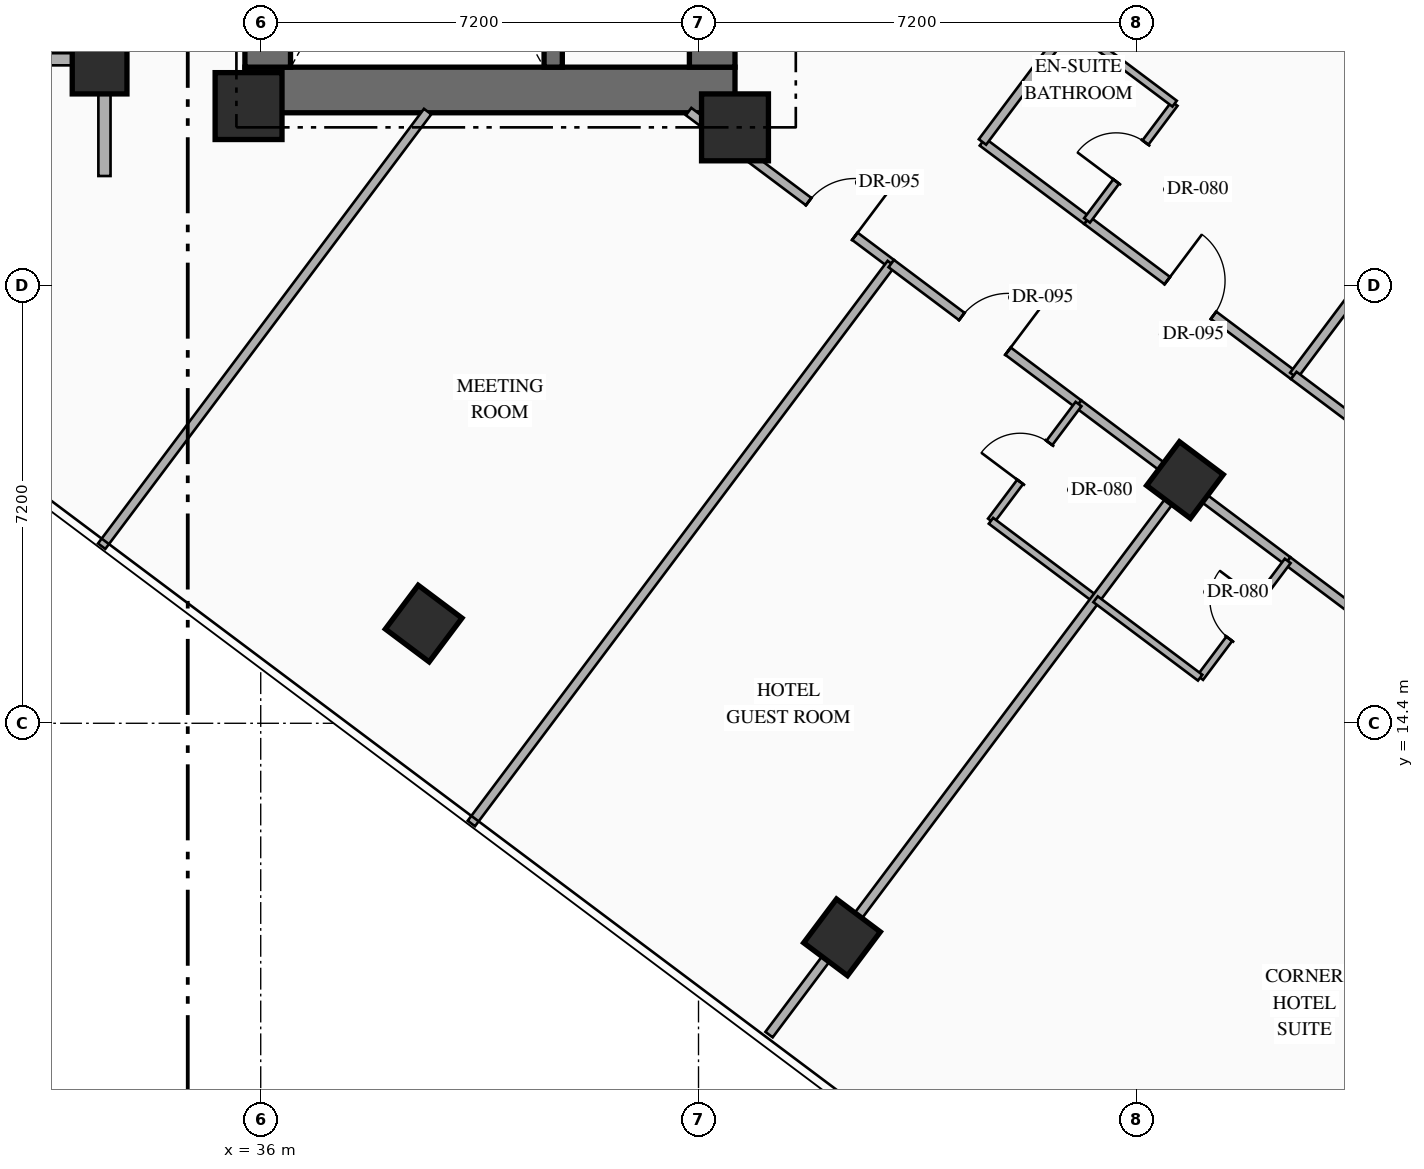
"""IFC4 building model, lengths in metres.
Left out: names, types, materials, properties, quantities, classifications, styles, units other than length and angle.
Written with IfcOpenShell. Run it as: python <this file> out.ifc"""

import sys

from ifc_helpers import new_model, si_unit, direction, frame, frame_2d, origin, origin_2d, place, context, subcontext, project, spatial, rectangle, hollow_rectangle, extrude, element, fill, save


model = new_model("IFC4")
c1 = context("Model", 3, precision=1e-05, world=origin(), true_north=direction((0.0, 1.0)))
c2 = subcontext(c1, "Body", "Model", "MODEL_VIEW")
j1 = project(units=[si_unit("LENGTHUNIT", "METRE"), si_unit("PLANEANGLEUNIT", "RADIAN")], contexts=[c1])
p1 = place(None, origin())
s1 = spatial("IfcSite", under=j1, at=p1, CompositionType="ELEMENT")
p2 = place(p1, origin())
s2 = spatial("IfcBuilding", under=s1, at=p2, CompositionType="ELEMENT")
p3 = place(p2, frame((0.0, 0.0, 70.1)))
s3 = spatial("IfcBuildingStorey", under=s2, at=p3, CompositionType="ELEMENT", Elevation=70.1)
p4 = place(p3, frame((35.74, 24.815, 0.0), z_axis=(0.0, 0.0, 1.0), x_axis=(1.0, 0.0, 0.0)))
e1 = element("IfcWall", 1, at=p4, inside=s3, PredefinedType="SHEAR", context=c2, shape_type="SweptSolid", body=[
    extrude(rectangle(XDim=8.06, YDim=0.75, at=frame_2d((4.03, 0.0))), origin(), (0.0, 0.0, 1.0), 4.5),
])
p5 = place(p3, frame((36.115, 25.19, 0.0), z_axis=(0.0, 0.0, 1.0), x_axis=(0.0, 1.0, 0.0)))
e2 = element("IfcWall", 2, at=p5, inside=s3, PredefinedType="SHEAR", context=c2, shape_type="SweptSolid", body=[
    extrude(rectangle(XDim=9.48, YDim=0.75, at=frame_2d((4.74, 0.0))), origin(), (0.0, 0.0, 1.0), 4.5),
])
p6 = place(p3, frame((43.425, 25.19, 0.0), z_axis=(0.0, 0.0, 1.0), x_axis=(0.0, 1.0, 0.0)))
e3 = element("IfcWall", 3, at=p6, inside=s3, PredefinedType="SHEAR", context=c2, shape_type="SweptSolid", body=[
    extrude(rectangle(XDim=9.48, YDim=0.75, at=frame_2d((4.74, 0.0))), origin(), (0.0, 0.0, 1.0), 4.5),
])
p7 = place(p6, frame((0.66, 0.0, 0.0)))
e4 = element("IfcOpeningElement", 4, at=p7, cuts=e3, PredefinedType="OPENING", context=c2, shape_type="SweptSolid", body=[
    extrude(rectangle(XDim=0.85, YDim=2.08, at=frame_2d((0.425, 1.04))), frame((0.0, 0.385, 0.0), z_axis=(0.0, -1.0, 0.0), x_axis=(1.0, 0.0, 0.0)), (0.0, 0.0, 1.0), 0.77),
])
p8 = place(p6, frame((2.86, 0.0, 0.0)))
e5 = element("IfcOpeningElement", 5, at=p8, cuts=e3, PredefinedType="OPENING", context=c2, shape_type="SweptSolid", body=[
    extrude(rectangle(XDim=0.85, YDim=2.08, at=frame_2d((0.425, 1.04))), frame((0.0, 0.385, 0.0), z_axis=(0.0, -1.0, 0.0), x_axis=(1.0, 0.0, 0.0)), (0.0, 0.0, 1.0), 0.77),
])
p9 = place(p6, frame((5.01, 0.0, 0.0)))
e6 = element("IfcOpeningElement", 6, at=p9, cuts=e3, PredefinedType="OPENING", context=c2, shape_type="SweptSolid", body=[
    extrude(rectangle(XDim=0.85, YDim=2.08, at=frame_2d((0.425, 1.04))), frame((0.0, 0.385, 0.0), z_axis=(0.0, -1.0, 0.0), x_axis=(1.0, 0.0, 0.0)), (0.0, 0.0, 1.0), 0.77),
])
p10 = place(p3, frame((40.81, 25.19, 0.0), z_axis=(0.0, 0.0, 1.0), x_axis=(0.0, 1.0, 0.0)))
e7 = element("IfcWall", 7, at=p10, inside=s3, PredefinedType="SHEAR", context=c2, shape_type="SweptSolid", body=[
    extrude(rectangle(XDim=9.48, YDim=0.3, at=frame_2d((4.74, 0.0))), origin(), (0.0, 0.0, 1.0), 4.5),
])
for number, where, z_axis, x_axis in (
    (8, (35.8, 24.55, 0.0), (0.0, 0.0, 1.0), (1.0, 0.0, 0.0)),
    (9, (43.8, 24.2, 0.0), (0.0, 0.0, 1.0), (1.0, 0.0, 0.0)),
):
    element("IfcColumn", number, at=place(p3, frame(where, z_axis=z_axis, x_axis=x_axis)), inside=s3, PredefinedType="COLUMN", context=c2, shape_type="SweptSolid", body=[
        extrude(rectangle(XDim=1.1, YDim=1.1, at=origin_2d()), origin(), (0.0, 0.0, 1.0), 4.5),
    ])
for number, where, z_axis, x_axis in (
    (10, (33.35, 25.2, 0.0), (0.0, 0.0, 1.0), (1.0, 0.0, 0.0)),
    (11, (38.68, 16.04, 0.0), (0.0, 0.0, 1.0), (0.8, -0.6, 0.0)),
    (12, (45.56, 10.88, 0.0), (0.0, 0.0, 1.0), (0.8, -0.6, 0.0)),
    (13, (51.2, 18.4, 0.0), (0.0, 0.0, 1.0), (0.8, -0.6, 0.0)),
):
    element("IfcColumn", number, at=place(p3, frame(where, z_axis=z_axis, x_axis=x_axis)), inside=s3, PredefinedType="COLUMN", context=c2, shape_type="SweptSolid", body=[
        extrude(hollow_rectangle(XDim=0.9, YDim=0.9, WallThickness=0.036, at=origin_2d()), origin(), (0.0, 0.0, 1.0), 4.5),
    ])
p11 = place(p3, frame((44.86, 40.73, 0.0), z_axis=(0.0, 0.0, 1.0), x_axis=(0.800006902154, -0.599990797017, 0.0)))
e14 = element("IfcWall", 14, at=p11, inside=s3, PredefinedType="STANDARD", context=c2, shape_type="SweptSolid", body=[
    extrude(rectangle(XDim=29.712, YDim=0.28, at=frame_2d((14.856, 0.0))), origin(), (0.0, 0.0, 1.0), 4.28),
])
p12 = place(p11, frame((14.249, 0.0, 0.0)))
e15 = element("IfcOpeningElement", 15, at=p12, cuts=e14, PredefinedType="OPENING", context=c2, shape_type="SweptSolid", body=[
    extrude(rectangle(XDim=1.1, YDim=2.2, at=frame_2d((0.55, 1.1))), frame((0.0, 0.15, 0.0), z_axis=(0.0, -1.0, 0.0), x_axis=(1.0, 0.0, 0.0)), (0.0, 0.0, 1.0), 0.3),
])
p13 = place(p11, frame((1.612, 0.0, 0.85)))
e16 = element("IfcOpeningElement", 16, at=p13, cuts=e14, PredefinedType="OPENING", context=c2, shape_type="SweptSolid", body=[
    extrude(rectangle(XDim=1.4, YDim=1.8, at=frame_2d((0.7, 0.9))), frame((0.0, 0.15, 0.0), z_axis=(0.0, -1.0, 0.0), x_axis=(1.0, 0.0, 0.0)), (0.0, 0.0, 1.0), 0.3),
])
p14 = place(p11, frame((5.667, 0.0, 0.85)))
e17 = element("IfcOpeningElement", 17, at=p14, cuts=e14, PredefinedType="OPENING", context=c2, shape_type="SweptSolid", body=[
    extrude(rectangle(XDim=1.4, YDim=1.8, at=frame_2d((0.7, 0.9))), frame((0.0, 0.15, 0.0), z_axis=(0.0, -1.0, 0.0), x_axis=(1.0, 0.0, 0.0)), (0.0, 0.0, 1.0), 0.3),
])
p15 = place(p11, frame((9.912, 0.0, 0.85)))
e18 = element("IfcOpeningElement", 18, at=p15, cuts=e14, PredefinedType="OPENING", context=c2, shape_type="SweptSolid", body=[
    extrude(rectangle(XDim=1.4, YDim=1.8, at=frame_2d((0.7, 0.9))), frame((0.0, 0.15, 0.0), z_axis=(0.0, -1.0, 0.0), x_axis=(1.0, 0.0, 0.0)), (0.0, 0.0, 1.0), 0.3),
])
p16 = place(p11, frame((19.743, 0.0, 0.85)))
e19 = element("IfcOpeningElement", 19, at=p16, cuts=e14, PredefinedType="OPENING", context=c2, shape_type="SweptSolid", body=[
    extrude(rectangle(XDim=1.4, YDim=1.8, at=frame_2d((0.7, 0.9))), frame((0.0, 0.15, 0.0), z_axis=(0.0, -1.0, 0.0), x_axis=(1.0, 0.0, 0.0)), (0.0, 0.0, 1.0), 0.3),
])
p17 = place(p11, frame((22.645, 0.0, 0.85)))
e20 = element("IfcOpeningElement", 20, at=p17, cuts=e14, PredefinedType="OPENING", context=c2, shape_type="SweptSolid", body=[
    extrude(rectangle(XDim=1.4, YDim=1.8, at=frame_2d((0.7, 0.9))), frame((0.0, 0.15, 0.0), z_axis=(0.0, -1.0, 0.0), x_axis=(1.0, 0.0, 0.0)), (0.0, 0.0, 1.0), 0.3),
])
p18 = place(p11, frame((26.354, 0.0, 0.85)))
e21 = element("IfcOpeningElement", 21, at=p18, cuts=e14, PredefinedType="OPENING", context=c2, shape_type="SweptSolid", body=[
    extrude(rectangle(XDim=1.4, YDim=1.8, at=frame_2d((0.7, 0.9))), frame((0.0, 0.15, 0.0), z_axis=(0.0, -1.0, 0.0), x_axis=(1.0, 0.0, 0.0)), (0.0, 0.0, 1.0), 0.3),
])
p19 = place(p3, frame((33.43, 23.4, 0.0), z_axis=(0.0, 0.0, 1.0), x_axis=(0.0, 1.0, 0.0)))
e22 = element("IfcWall", 22, at=p19, inside=s3, PredefinedType="STANDARD", context=c2, shape_type="SweptSolid", body=[
    extrude(rectangle(XDim=4.08, YDim=0.2, at=frame_2d((2.04, 0.0))), origin(), (0.0, 0.0, 1.0), 3.475),
])
p20 = place(p3, frame((25.55, 25.32, 0.0), z_axis=(0.0, 0.0, 1.0), x_axis=(1.0, 0.0, 0.0)))
e23 = element("IfcWall", 23, at=p20, inside=s3, PredefinedType="STANDARD", context=c2, shape_type="SweptSolid", body=[
    extrude(rectangle(XDim=7.88, YDim=0.2, at=frame_2d((3.94, 0.0))), origin(), (0.0, 0.0, 1.0), 3.675),
])
p21 = place(p3, frame((43.037, 24.46, 0.0), z_axis=(0.0, 0.0, 1.0), x_axis=(0.799971872363, -0.600037501685, 0.0)))
e24 = element("IfcWall", 24, at=p21, inside=s3, PredefinedType="PARTITIONING", context=c2, shape_type="SweptSolid", body=[
    extrude(rectangle(XDim=4.167, YDim=0.15, at=frame_2d((2.083, 0.0))), origin(), (0.0, 0.0, 1.0), 3.475),
])
p22 = place(p21, frame((2.468, 0.0, 0.0)))
e25 = element("IfcOpeningElement", 25, at=p22, cuts=e24, PredefinedType="OPENING", context=c2, shape_type="SweptSolid", body=[
    extrude(rectangle(XDim=0.95, YDim=2.15, at=frame_2d((0.475, 1.075))), frame((0.0, 0.085, 0.0), z_axis=(0.0, -1.0, 0.0), x_axis=(1.0, 0.0, 0.0)), (0.0, 0.0, 1.0), 0.17),
])
p23 = place(p3, frame((33.384, 17.312, 0.0), z_axis=(0.0, 0.0, 1.0), x_axis=(0.600008743659, 0.799993442181, 0.0)))
e26 = element("IfcWall", 26, at=p23, inside=s3, PredefinedType="PARTITIONING", context=c2, shape_type="SweptSolid", body=[
    extrude(rectangle(XDim=8.935, YDim=0.15, at=frame_2d((4.468, 0.0))), origin(), (0.0, 0.0, 1.0), 4.28),
])
p24 = place(p3, frame((39.464, 12.752, 0.0), z_axis=(0.0, 0.0, 1.0), x_axis=(0.6, 0.8, 0.0)))
e27 = element("IfcWall", 27, at=p24, inside=s3, PredefinedType="PARTITIONING", context=c2, shape_type="SweptSolid", body=[
    extrude(rectangle(XDim=11.51, YDim=0.15, at=frame_2d((5.755, 0.0))), origin(), (0.0, 0.0, 1.0), 4.28),
])
p25 = place(p3, frame((47.87, 23.96, 0.0), z_axis=(0.0, 0.0, 1.0), x_axis=(0.79998637334, -0.60001816845, 0.0)))
e28 = element("IfcWall", 28, at=p25, inside=s3, PredefinedType="PARTITIONING", context=c2, shape_type="SweptSolid", body=[
    extrude(rectangle(XDim=2.15, YDim=0.15, at=frame_2d((1.075, 0.0))), origin(), (0.0, 0.0, 1.0), 3.925),
])
p26 = place(p3, frame((49.59, 22.67, 0.0), z_axis=(0.0, 0.0, 1.0), x_axis=(0.800013787187, -0.599981616644, 0.0)))
e29 = element("IfcWall", 29, at=p26, inside=s3, PredefinedType="PARTITIONING", context=c2, shape_type="SweptSolid", body=[
    extrude(rectangle(XDim=4.25, YDim=0.15, at=frame_2d((2.125, 0.0))), origin(), (0.0, 0.0, 1.0), 3.925),
])
p27 = place(p26, frame((1.65, 0.0, 0.0)))
e30 = element("IfcOpeningElement", 30, at=p27, cuts=e29, PredefinedType="OPENING", context=c2, shape_type="SweptSolid", body=[
    extrude(rectangle(XDim=0.95, YDim=2.15, at=frame_2d((0.475, 1.075))), frame((0.0, 0.085, 0.0), z_axis=(0.0, -1.0, 0.0), x_axis=(1.0, 0.0, 0.0)), (0.0, 0.0, 1.0), 0.17),
])
p28 = place(p3, frame((49.59, 22.67, 0.0), z_axis=(0.0, 0.0, 1.0), x_axis=(0.599951172744, 0.800036618114, 0.0)))
e31 = element("IfcWall", 31, at=p28, inside=s3, PredefinedType="PARTITIONING", context=c2, shape_type="SweptSolid", body=[
    extrude(rectangle(XDim=2.4, YDim=0.12, at=frame_2d((1.2, 0.0))), origin(), (0.0, 0.0, 1.0), 4.28),
])
p29 = place(p28, frame((0.8, 0.0, 0.0)))
e32 = element("IfcOpeningElement", 32, at=p29, cuts=e31, PredefinedType="OPENING", context=c2, shape_type="SweptSolid", body=[
    extrude(rectangle(XDim=0.8, YDim=2.06, at=frame_2d((0.4, 1.03))), frame((0.0, 0.07, 0.0), z_axis=(0.0, -1.0, 0.0), x_axis=(1.0, 0.0, 0.0)), (0.0, 0.0, 1.0), 0.14),
])
p30 = place(p3, frame((49.31, 25.88, 0.0), z_axis=(0.0, 0.0, 1.0), x_axis=(0.800040880289, -0.59994548908, 0.0)))
e33 = element("IfcWall", 33, at=p30, inside=s3, PredefinedType="PARTITIONING", context=c2, shape_type="SweptSolid", body=[
    extrude(rectangle(XDim=2.15, YDim=0.12, at=frame_2d((1.075, 0.0))), origin(), (0.0, 0.0, 1.0), 4.28),
])
for number, where, z_axis, x_axis in (
    (34, (47.87, 23.96, 0.0), (0.0, 0.0, 1.0), (0.6, 0.8, 0.0)),
    (35, (52.99, 20.12, 0.0), (0.0, 0.0, 1.0), (0.6, 0.8, 0.0)),
):
    element("IfcWall", number, at=place(p3, frame(where, z_axis=z_axis, x_axis=x_axis)), inside=s3, PredefinedType="PARTITIONING", context=c2, shape_type="SweptSolid", body=[
        extrude(rectangle(XDim=11.55, YDim=0.15, at=frame_2d((5.775, 0.0))), origin(), (0.0, 0.0, 1.0), 4.28),
    ])
p31 = place(p3, frame((52.99, 20.12, 0.0), z_axis=(0.0, 0.0, 1.0), x_axis=(0.79998637334, -0.60001816845, 0.0)))
e36 = element("IfcWall", 36, at=p31, inside=s3, PredefinedType="PARTITIONING", context=c2, shape_type="SweptSolid", body=[
    extrude(rectangle(XDim=2.15, YDim=0.15, at=frame_2d((1.075, 0.0))), origin(), (0.0, 0.0, 1.0), 3.925),
])
p32 = place(p3, frame((46.37, 21.96, 0.0), z_axis=(0.0, 0.0, 1.0), x_axis=(0.799977170108, -0.600030438649, 0.0)))
e37 = element("IfcWall", 37, at=p32, inside=s3, PredefinedType="PARTITIONING", context=c2, shape_type="SweptSolid", body=[
    extrude(rectangle(XDim=3.85, YDim=0.15, at=frame_2d((1.925, 0.0))), origin(), (0.0, 0.0, 1.0), 3.475),
])
p33 = place(p32, frame((1.45, 0.0, 0.0)))
e38 = element("IfcOpeningElement", 38, at=p33, cuts=e37, PredefinedType="OPENING", context=c2, shape_type="SweptSolid", body=[
    extrude(rectangle(XDim=0.95, YDim=2.15, at=frame_2d((0.475, 1.075))), frame((0.0, 0.085, 0.0), z_axis=(0.0, -1.0, 0.0), x_axis=(1.0, 0.0, 0.0)), (0.0, 0.0, 1.0), 0.17),
])
p34 = place(p3, frame((49.45, 19.65, 0.0), z_axis=(0.0, 0.0, 1.0), x_axis=(0.800040880289, -0.59994548908, 0.0)))
e39 = element("IfcWall", 39, at=p34, inside=s3, PredefinedType="PARTITIONING", context=c2, shape_type="SweptSolid", body=[
    extrude(rectangle(XDim=2.15, YDim=0.15, at=frame_2d((1.075, 0.0))), origin(), (0.0, 0.0, 1.0), 3.475),
])
p35 = place(p3, frame((48.01, 17.73, 0.0), z_axis=(0.0, 0.0, 1.0), x_axis=(0.6, 0.8, 0.0)))
e40 = element("IfcWall", 40, at=p35, inside=s3, PredefinedType="PARTITIONING", context=c2, shape_type="SweptSolid", body=[
    extrude(rectangle(XDim=2.4, YDim=0.12, at=frame_2d((1.2, 0.0))), origin(), (0.0, 0.0, 1.0), 4.28),
])
p36 = place(p35, frame((0.8, 0.0, 0.0)))
e41 = element("IfcOpeningElement", 41, at=p36, cuts=e40, PredefinedType="OPENING", context=c2, shape_type="SweptSolid", body=[
    extrude(rectangle(XDim=0.8, YDim=2.06, at=frame_2d((0.4, 1.03))), frame((0.0, 0.07, 0.0), z_axis=(0.0, -1.0, 0.0), x_axis=(1.0, 0.0, 0.0)), (0.0, 0.0, 1.0), 0.14),
])
p37 = place(p3, frame((48.01, 17.73, 0.0), z_axis=(0.0, 0.0, 1.0), x_axis=(0.79998637334, -0.60001816845, 0.0)))
e42 = element("IfcWall", 42, at=p37, inside=s3, PredefinedType="PARTITIONING", context=c2, shape_type="SweptSolid", body=[
    extrude(rectangle(XDim=2.15, YDim=0.12, at=frame_2d((1.075, 0.0))), origin(), (0.0, 0.0, 1.0), 4.28),
])
p38 = place(p3, frame((44.36, 9.28, 0.0), z_axis=(0.0, 0.0, 1.0), x_axis=(0.599986233332, 0.800010324816, 0.0)))
e43 = element("IfcWall", 43, at=p38, inside=s3, PredefinedType="PARTITIONING", context=c2, shape_type="SweptSolid", body=[
    extrude(rectangle(XDim=11.35, YDim=0.15, at=frame_2d((5.675, 0.0))), origin(), (0.0, 0.0, 1.0), 3.475),
])
p39 = place(p3, frame((51.17, 18.36, 0.0), z_axis=(0.0, 0.0, 1.0), x_axis=(0.79998637334, -0.60001816845, 0.0)))
e44 = element("IfcWall", 44, at=p39, inside=s3, PredefinedType="PARTITIONING", context=c2, shape_type="SweptSolid", body=[
    extrude(rectangle(XDim=2.15, YDim=0.15, at=frame_2d((1.075, 0.0))), origin(), (0.0, 0.0, 1.0), 3.475),
])
p40 = place(p3, frame((52.89, 17.07, 0.0), z_axis=(0.0, 0.0, 1.0), x_axis=(0.8, -0.6, 0.0)))
e45 = element("IfcWall", 45, at=p40, inside=s3, PredefinedType="PARTITIONING", context=c2, shape_type="SweptSolid", body=[
    extrude(rectangle(XDim=11.51, YDim=0.15, at=frame_2d((5.755, 0.0))), origin(), (0.0, 0.0, 1.0), 3.475),
])
p41 = place(p40, frame((5.28, 0.0, 0.0)))
e46 = element("IfcOpeningElement", 46, at=p41, cuts=e45, PredefinedType="OPENING", context=c2, shape_type="SweptSolid", body=[
    extrude(rectangle(XDim=0.95, YDim=2.15, at=frame_2d((0.475, 1.075))), frame((0.0, 0.085, 0.0), z_axis=(0.0, -1.0, 0.0), x_axis=(1.0, 0.0, 0.0)), (0.0, 0.0, 1.0), 0.17),
])
p42 = place(p3, frame((51.45, 15.15, 0.0), z_axis=(0.0, 0.0, 1.0), x_axis=(0.599951172744, 0.800036618114, 0.0)))
e47 = element("IfcWall", 47, at=p42, inside=s3, PredefinedType="PARTITIONING", context=c2, shape_type="SweptSolid", body=[
    extrude(rectangle(XDim=2.4, YDim=0.12, at=frame_2d((1.2, 0.0))), origin(), (0.0, 0.0, 1.0), 4.28),
])
p43 = place(p42, frame((0.8, 0.0, 0.0)))
e48 = element("IfcOpeningElement", 48, at=p43, cuts=e47, PredefinedType="OPENING", context=c2, shape_type="SweptSolid", body=[
    extrude(rectangle(XDim=0.8, YDim=2.06, at=frame_2d((0.4, 1.03))), frame((0.0, 0.07, 0.0), z_axis=(0.0, -1.0, 0.0), x_axis=(1.0, 0.0, 0.0)), (0.0, 0.0, 1.0), 0.14),
])
p44 = place(p3, frame((49.73, 16.44, 0.0), z_axis=(0.0, 0.0, 1.0), x_axis=(0.79998637334, -0.60001816845, 0.0)))
e49 = element("IfcWall", 49, at=p44, inside=s3, PredefinedType="PARTITIONING", context=c2, shape_type="SweptSolid", body=[
    extrude(rectangle(XDim=2.15, YDim=0.12, at=frame_2d((1.075, 0.0))), origin(), (0.0, 0.0, 1.0), 4.28),
])
p45 = place(p22, origin())
e50 = element("IfcDoor", 50, at=p45, inside=s3, OperationType="SINGLE_SWING_RIGHT", PredefinedType="DOOR", context=c2, shape_type="SweptSolid", body=[
    extrude(rectangle(XDim=0.95, YDim=2.15, at=frame_2d((0.475, 1.075))), frame((0.0, 0.025, 0.0), z_axis=(0.0, -1.0, 0.0), x_axis=(1.0, 0.0, 0.0)), (0.0, 0.0, 1.0), 0.05),
])
fill(e25, e50)
p46 = place(p27, origin())
e51 = element("IfcDoor", 51, at=p46, inside=s3, OperationType="SINGLE_SWING_LEFT", PredefinedType="DOOR", context=c2, shape_type="SweptSolid", body=[
    extrude(rectangle(XDim=0.95, YDim=2.15, at=frame_2d((0.475, 1.075))), frame((0.0, 0.025, 0.0), z_axis=(0.0, -1.0, 0.0), x_axis=(1.0, 0.0, 0.0)), (0.0, 0.0, 1.0), 0.05),
])
fill(e30, e51)
p47 = place(p29, origin())
e52 = element("IfcDoor", 52, at=p47, inside=s3, OperationType="SINGLE_SWING_LEFT", PredefinedType="DOOR", context=c2, shape_type="SweptSolid", body=[
    extrude(rectangle(XDim=0.8, YDim=2.06, at=frame_2d((0.4, 1.03))), frame((0.0, 0.025, 0.0), z_axis=(0.0, -1.0, 0.0), x_axis=(1.0, 0.0, 0.0)), (0.0, 0.0, 1.0), 0.05),
])
fill(e32, e52)
p48 = place(p33, origin())
e53 = element("IfcDoor", 53, at=p48, inside=s3, OperationType="SINGLE_SWING_RIGHT", PredefinedType="DOOR", context=c2, shape_type="SweptSolid", body=[
    extrude(rectangle(XDim=0.95, YDim=2.15, at=frame_2d((0.475, 1.075))), frame((0.0, 0.025, 0.0), z_axis=(0.0, -1.0, 0.0), x_axis=(1.0, 0.0, 0.0)), (0.0, 0.0, 1.0), 0.05),
])
fill(e38, e53)
p49 = place(p36, origin())
e54 = element("IfcDoor", 54, at=p49, inside=s3, OperationType="SINGLE_SWING_LEFT", PredefinedType="DOOR", context=c2, shape_type="SweptSolid", body=[
    extrude(rectangle(XDim=0.8, YDim=2.06, at=frame_2d((0.4, 1.03))), frame((0.0, 0.025, 0.0), z_axis=(0.0, -1.0, 0.0), x_axis=(1.0, 0.0, 0.0)), (0.0, 0.0, 1.0), 0.05),
])
fill(e41, e54)
p50 = place(p43, origin())
e55 = element("IfcDoor", 55, at=p50, inside=s3, OperationType="SINGLE_SWING_RIGHT", PredefinedType="DOOR", context=c2, shape_type="SweptSolid", body=[
    extrude(rectangle(XDim=0.8, YDim=2.06, at=frame_2d((0.4, 1.03))), frame((0.0, 0.025, 0.0), z_axis=(0.0, -1.0, 0.0), x_axis=(1.0, 0.0, 0.0)), (0.0, 0.0, 1.0), 0.05),
])
fill(e48, e55)
save(model, sys.argv[1])
